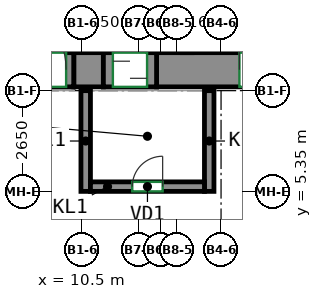
"""IFC4 building model, lengths in metres.
Left out: names, types, materials, properties, quantities, classifications, styles, units other than length and angle.
Written with IfcOpenShell. Run it as: python <this file> out.ifc"""

import sys

from ifc_helpers import new_model, si_unit, direction, frame, frame_2d, origin, place, context, subcontext, project, spatial, rectangle, extrude, source, transform, mapped, element, fill, save


model = new_model("IFC4")
c1 = context("Model", 3, precision=1e-05, world=origin(), true_north=direction((0.0, 1.0)))
c2 = subcontext(c1, "Body", "Model", "MODEL_VIEW")
j1 = project(units=[si_unit("LENGTHUNIT", "METRE"), si_unit("PLANEANGLEUNIT", "RADIAN")], contexts=[c1])
p1 = place(None, origin())
s1 = spatial("IfcSite", under=j1, at=p1, CompositionType="ELEMENT")
p2 = place(p1, origin())
s2 = spatial("IfcBuilding", under=s1, at=p2, CompositionType="ELEMENT")
p3 = place(p2, frame((0.0, 0.0, 138.5)))
s3 = spatial("IfcBuildingStorey", under=s2, at=p3, CompositionType="ELEMENT", Elevation=138.5)
m1 = source(origin(), c2, "Body", "SweptSolid", [
    extrude(rectangle(XDim=0.78, YDim=0.9, at=frame_2d((0.39, 0.0))), origin(), (0.0, 0.0, 1.0), 5.12),
])
p4 = place(p3, frame((10.29, 8.55, 0.0), z_axis=(0.0, 0.0, 1.0), x_axis=(1.0, 0.0, 0.0)))
e1 = element("IfcWall", 1, at=p4, inside=s3, PredefinedType="SHEAR", context=c2, shape_type="MappedRepresentation", body=[
    mapped(m1, transform((0.0, 0.0, 0.0))),
])
m2 = source(origin(), c2, "Body", "SweptSolid", [
    extrude(rectangle(XDim=5.53, YDim=0.9, at=frame_2d((2.765, 0.0))), origin(), (0.0, 0.0, 1.0), 5.12),
])
p5 = place(p3, frame((12.47, 8.55, 0.0), z_axis=(0.0, 0.0, 1.0), x_axis=(1.0, 0.0, 0.0)))
e2 = element("IfcWall", 2, at=p5, inside=s3, PredefinedType="SHEAR", context=c2, shape_type="MappedRepresentation", body=[
    mapped(m2, transform((0.0, 0.0, 0.0))),
])
p6 = place(p5, frame((2.18, 0.0, 0.0)))
e3 = element("IfcOpeningElement", 3, at=p6, cuts=e2, PredefinedType="OPENING", context=c2, shape_type="SweptSolid", body=[
    extrude(rectangle(XDim=1.2, YDim=2.1, at=frame_2d((0.6, 1.05))), frame((0.0, 0.46, 0.0), z_axis=(0.0, -1.0, 0.0), x_axis=(1.0, 0.0, 0.0)), (0.0, 0.0, 1.0), 0.92),
])
m3 = source(origin(), c2, "Body", "SweptSolid", [
    extrude(rectangle(XDim=2.4, YDim=0.9, at=frame_2d((1.2, 0.0))), origin(), (0.0, 0.0, 1.0), 0.92),
])
p7 = place(p3, frame((7.89, 8.55, 4.2), z_axis=(0.0, 0.0, 1.0), x_axis=(1.0, 0.0, 0.0)))
e4 = element("IfcWall", 4, at=p7, inside=s3, PredefinedType="SHEAR", context=c2, shape_type="MappedRepresentation", body=[
    mapped(m3, transform((0.0, 0.0, 0.0))),
])
m4 = source(origin(), c2, "Body", "SweptSolid", [
    extrude(rectangle(XDim=1.4, YDim=0.9, at=frame_2d((0.7, 0.0))), origin(), (0.0, 0.0, 1.0), 1.17),
])
p8 = place(p3, frame((11.07, 8.55, 3.95), z_axis=(0.0, 0.0, 1.0), x_axis=(1.0, 0.0, 0.0)))
e5 = element("IfcWall", 5, at=p8, inside=s3, PredefinedType="SHEAR", context=c2, shape_type="MappedRepresentation", body=[
    mapped(m4, transform((0.0, 0.0, 0.0))),
])
m5 = source(origin(), c2, "Body", "SweptSolid", [
    extrude(rectangle(XDim=2.65, YDim=0.25, at=frame_2d((1.325, 0.0))), origin(), (0.0, 0.0, 1.0), 5.12),
])
for number, where, z_axis, x_axis in (
    (6, (10.605, 5.35, 0.0), (0.0, 0.0, 1.0), (0.0, 1.0, 0.0)),
    (7, (13.855, 5.35, 0.0), (0.0, 0.0, 1.0), (0.0, 1.0, 0.0)),
):
    element("IfcWall", number, at=place(p3, frame(where, z_axis=z_axis, x_axis=x_axis)), inside=s3, PredefinedType="PARTITIONING", context=c2, shape_type="MappedRepresentation", body=[
        mapped(m5, transform((0.0, 0.0, 0.0))),
    ])
m6 = source(origin(), c2, "Body", "SweptSolid", [
    extrude(rectangle(XDim=3.0, YDim=0.25, at=frame_2d((1.5, 0.0))), origin(), (0.0, 0.0, 1.0), 5.12),
])
p9 = place(p3, frame((10.73, 5.475, 0.0), z_axis=(0.0, 0.0, 1.0), x_axis=(1.0, 0.0, 0.0)))
e8 = element("IfcWall", 8, at=p9, inside=s3, PredefinedType="PARTITIONING", context=c2, shape_type="MappedRepresentation", body=[
    mapped(m6, transform((0.0, 0.0, 0.0))),
])
p10 = place(p9, frame((1.1, 0.0, 0.0)))
e9 = element("IfcOpeningElement", 9, at=p10, cuts=e8, PredefinedType="OPENING", context=c2, shape_type="SweptSolid", body=[
    extrude(rectangle(XDim=0.8, YDim=2.0, at=frame_2d((0.4, 1.0))), frame((0.0, 0.135, 0.0), z_axis=(0.0, -1.0, 0.0), x_axis=(1.0, 0.0, 0.0)), (0.0, 0.0, 1.0), 0.27),
])
m7 = source(origin(), c2, "Body", "SweptSolid", [
    extrude(rectangle(XDim=2.4, YDim=0.9, at=frame_2d((1.2, 0.0))), origin(), (0.0, 0.0, 1.0), 2.7),
])
p11 = place(p3, frame((7.89, 8.55, 0.0), z_axis=(0.0, 0.0, 1.0), x_axis=(1.0, 0.0, 0.0)))
e10 = element("IfcWall", 10, at=p11, inside=s3, PredefinedType="PARTITIONING", context=c2, shape_type="MappedRepresentation", body=[
    mapped(m7, transform((0.0, 0.0, 0.0))),
])
p12 = place(p11, frame((0.2, 0.0, 0.0)))
e11 = element("IfcOpeningElement", 11, at=p12, cuts=e10, PredefinedType="OPENING", context=c2, shape_type="SweptSolid", body=[
    extrude(rectangle(XDim=2.0, YDim=2.1, at=frame_2d((1.0, 1.05))), frame((0.0, 0.46, 0.0), z_axis=(0.0, -1.0, 0.0), x_axis=(1.0, 0.0, 0.0)), (0.0, 0.0, 1.0), 0.92),
])
m8 = source(origin(), c2, "Body", "SweptSolid", [
    extrude(rectangle(XDim=1.4, YDim=0.9, at=frame_2d((0.7, 0.0))), origin(), (0.0, 0.0, 1.0), 2.7),
])
p13 = place(p3, frame((11.07, 8.55, 0.0), z_axis=(0.0, 0.0, 1.0), x_axis=(1.0, 0.0, 0.0)))
e12 = element("IfcWall", 12, at=p13, inside=s3, PredefinedType="PARTITIONING", context=c2, shape_type="MappedRepresentation", body=[
    mapped(m8, transform((0.0, 0.0, 0.0))),
])
p14 = place(p13, frame((0.25, 0.0, 0.0)))
e13 = element("IfcOpeningElement", 13, at=p14, cuts=e12, PredefinedType="OPENING", context=c2, shape_type="SweptSolid", body=[
    extrude(rectangle(XDim=0.9, YDim=2.1, at=frame_2d((0.45, 1.05))), frame((0.0, 0.46, 0.0), z_axis=(0.0, -1.0, 0.0), x_axis=(1.0, 0.0, 0.0)), (0.0, 0.0, 1.0), 0.92),
])
p15 = place(p12, origin())
e14 = element("IfcDoor", 14, at=p15, inside=s3, OperationType="DOUBLE_DOOR_SINGLE_SWING", PredefinedType="DOOR", context=c2, shape_type="SweptSolid", body=[
    extrude(rectangle(XDim=2.0, YDim=2.1, at=frame_2d((1.0, 1.05))), frame((0.0, 0.355, 0.0), z_axis=(0.0, -1.0, 0.0), x_axis=(1.0, 0.0, 0.0)), (0.0, 0.0, 1.0), 0.05),
])
fill(e11, e14)
p16 = place(p10, origin())
e15 = element("IfcDoor", 15, at=p16, inside=s3, OperationType="SINGLE_SWING_RIGHT", PredefinedType="DOOR", context=c2, shape_type="SweptSolid", body=[
    extrude(rectangle(XDim=0.8, YDim=2.0, at=frame_2d((0.4, 1.0))), frame((0.0, 0.025, 0.0), z_axis=(0.0, -1.0, 0.0), x_axis=(1.0, 0.0, 0.0)), (0.0, 0.0, 1.0), 0.05),
])
fill(e9, e15)
p17 = place(p14, origin())
e16 = element("IfcDoor", 16, at=p17, inside=s3, OperationType="SLIDING_TO_LEFT", PredefinedType="DOOR", context=c2, shape_type="SweptSolid", body=[
    extrude(rectangle(XDim=0.9, YDim=2.1, at=frame_2d((0.45, 1.05))), frame((0.0, 0.355, 0.0), z_axis=(0.0, -1.0, 0.0), x_axis=(1.0, 0.0, 0.0)), (0.0, 0.0, 1.0), 0.05),
])
fill(e13, e16)
p18 = place(p6, origin())
e17 = element("IfcDoor", 17, at=p18, inside=s3, OperationType="DOUBLE_DOOR_SINGLE_SWING", PredefinedType="DOOR", context=c2, shape_type="SweptSolid", body=[
    extrude(rectangle(XDim=1.2, YDim=2.1, at=frame_2d((0.6, 1.05))), frame((0.0, 0.355, 0.0), z_axis=(0.0, -1.0, 0.0), x_axis=(1.0, 0.0, 0.0)), (0.0, 0.0, 1.0), 0.05),
])
fill(e3, e17)
save(model, sys.argv[1])
